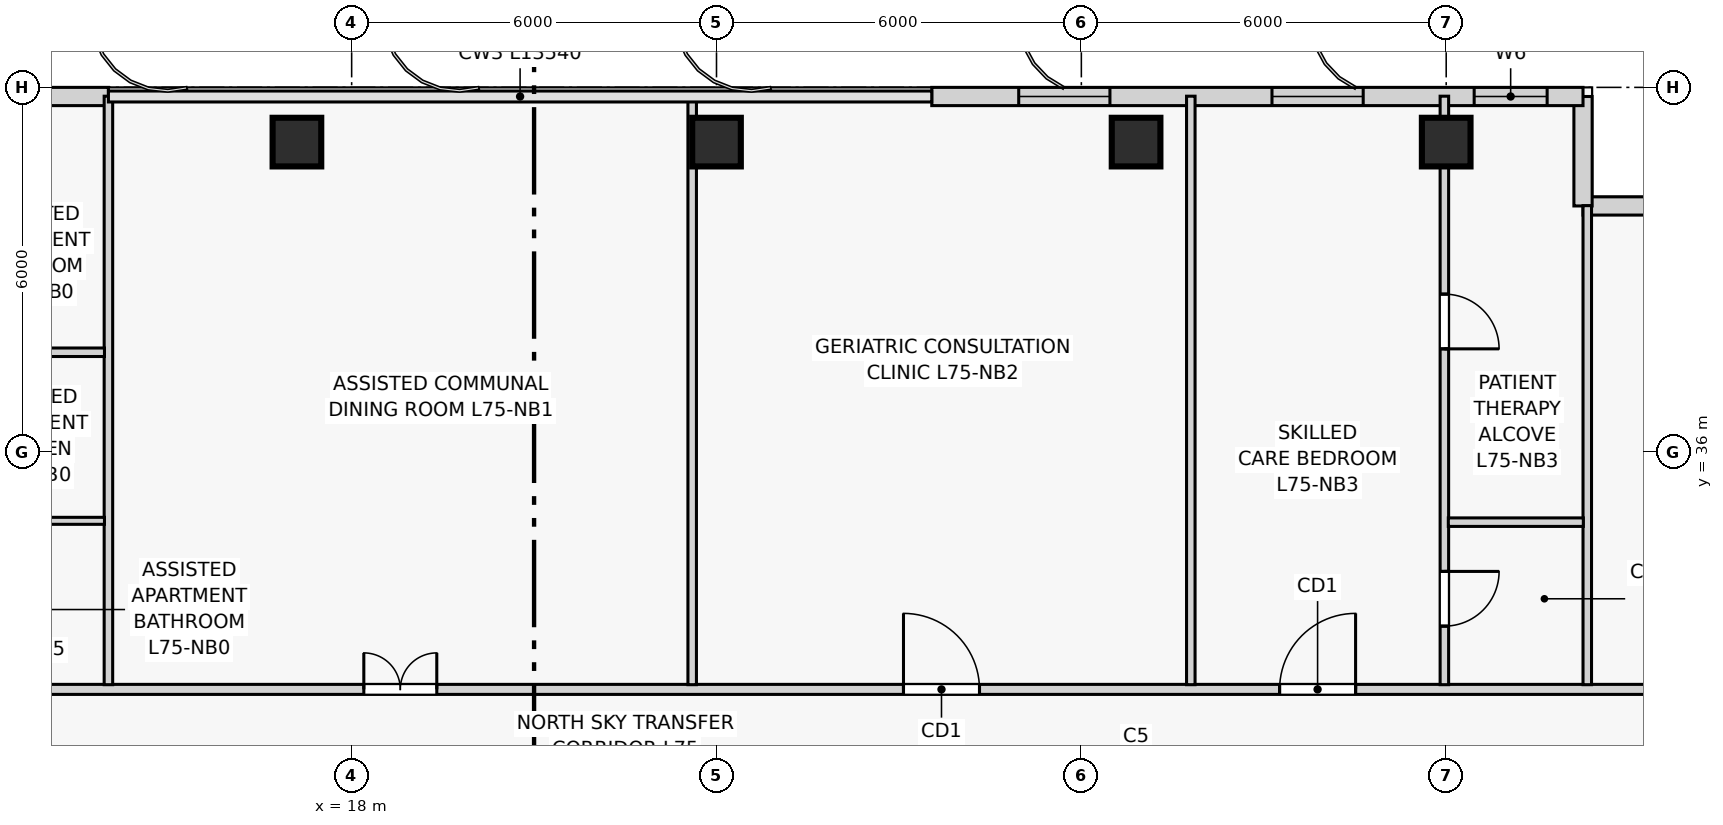
"""IFC4 building model, lengths in metres.
Left out: names, types, materials, properties, quantities, classifications, styles, units other than length and angle.
Written with IfcOpenShell. Run it as: python <this file> out.ifc"""

import sys

from ifc_helpers import new_model, si_unit, direction, frame, frame_2d, origin, origin_2d, place, context, subcontext, project, spatial, rectangle, extrude, source, transform, mapped, element, fill, save


model = new_model("IFC4")
c1 = context("Model", 3, precision=1e-05, world=origin(), true_north=direction((0.0, 1.0)))
c2 = subcontext(c1, "Body", "Model", "MODEL_VIEW")
j1 = project(units=[si_unit("LENGTHUNIT", "METRE"), si_unit("PLANEANGLEUNIT", "RADIAN")], contexts=[c1])
p1 = place(None, origin())
s1 = spatial("IfcSite", under=j1, at=p1, CompositionType="ELEMENT")
p2 = place(p1, origin())
s2 = spatial("IfcBuilding", under=s1, at=p2, CompositionType="ELEMENT")
p3 = place(p2, frame((0.0, 0.0, 285.3)))
s3 = spatial("IfcBuildingStorey", under=s2, at=p3, CompositionType="ELEMENT", Elevation=285.3)
m1 = source(origin(), c2, "Body", "SweptSolid", [
    extrude(rectangle(XDim=0.8, YDim=0.8, at=origin_2d()), origin(), (0.0, 0.0, 1.0), 4.2),
])
for number, where, z_axis, x_axis in (
    (1, (17.1, 41.1, 0.0), (0.0, 0.0, 1.0), (1.0, 0.0, 0.0)),
    (2, (24.0, 41.1, 0.0), (0.0, 0.0, 1.0), (1.0, 0.0, 0.0)),
    (3, (30.9, 41.1, 0.0), (0.0, 0.0, 1.0), (1.0, 0.0, 0.0)),
    (4, (36.0, 41.1, 0.0), (0.0, 0.0, 1.0), (1.0, 0.0, 0.0)),
):
    element("IfcColumn", number, at=place(p3, frame(where, z_axis=z_axis, x_axis=x_axis)), inside=s3, PredefinedType="COLUMN", context=c2, shape_type="MappedRepresentation", body=[
        mapped(m1, transform((0.0, 0.0, 0.0), scale=1.0)),
    ])
for number, where, z_axis, x_axis in (
    (5, (40.05, 40.05, 0.0), (0.0, 0.0, 1.0), (-1.0, 0.0, 0.0)),
    (6, (38.25, 40.05, 0.0), (0.0, 0.0, 1.0), (0.0, 1.0, 0.0)),
):
    element("IfcWall", number, at=place(p3, frame(where, z_axis=z_axis, x_axis=x_axis)), inside=s3, PredefinedType="SOLIDWALL", context=c2, shape_type="SweptSolid", body=[
        extrude(rectangle(XDim=1.8, YDim=0.3, at=frame_2d((0.9, 0.0))), origin(), (0.0, 0.0, 1.0), 3.92),
    ])
p4 = place(p3, frame((38.25, 41.85, 0.0), z_axis=(0.0, 0.0, 1.0), x_axis=(-1.0, 0.0, 0.0)))
e7 = element("IfcWall", 7, at=p4, inside=s3, PredefinedType="SOLIDWALL", context=c2, shape_type="SweptSolid", body=[
    extrude(rectangle(XDim=10.71, YDim=0.3, at=frame_2d((5.355, 0.0))), origin(), (0.0, 0.0, 1.0), 3.92),
])
p5 = place(p4, frame((0.59, 0.0, 0.95)))
e8 = element("IfcOpeningElement", 8, at=p5, cuts=e7, PredefinedType="OPENING", context=c2, shape_type="SweptSolid", body=[
    extrude(rectangle(XDim=1.2, YDim=1.5, at=frame_2d((0.6, 0.75))), frame((0.0, 0.16, 0.0), z_axis=(0.0, -1.0, 0.0), x_axis=(1.0, 0.0, 0.0)), (0.0, 0.0, 1.0), 0.32),
])
p6 = place(p4, frame((3.615, 0.0, 0.85)))
e9 = element("IfcOpeningElement", 9, at=p6, cuts=e7, PredefinedType="OPENING", context=c2, shape_type="SweptSolid", body=[
    extrude(rectangle(XDim=1.5, YDim=1.8, at=frame_2d((0.75, 0.9))), frame((0.0, 0.16, 0.0), z_axis=(0.0, -1.0, 0.0), x_axis=(1.0, 0.0, 0.0)), (0.0, 0.0, 1.0), 0.32),
])
p7 = place(p4, frame((7.78, 0.0, 0.85)))
e10 = element("IfcOpeningElement", 10, at=p7, cuts=e7, PredefinedType="OPENING", context=c2, shape_type="SweptSolid", body=[
    extrude(rectangle(XDim=1.5, YDim=1.8, at=frame_2d((0.75, 0.9))), frame((0.0, 0.16, 0.0), z_axis=(0.0, -1.0, 0.0), x_axis=(1.0, 0.0, 0.0)), (0.0, 0.0, 1.0), 0.32),
])
p8 = place(p3, frame((14.0, 41.85, 0.0), z_axis=(0.0, 0.0, 1.0), x_axis=(-1.0, 0.0, 0.0)))
e11 = element("IfcWall", 11, at=p8, inside=s3, PredefinedType="SOLIDWALL", context=c2, shape_type="SweptSolid", body=[
    extrude(rectangle(XDim=7.25, YDim=0.3, at=frame_2d((3.625, 0.0))), origin(), (0.0, 0.0, 1.0), 3.92),
])
p9 = place(p8, frame((1.057, 0.0, 0.85)))
e12 = element("IfcOpeningElement", 12, at=p9, cuts=e11, PredefinedType="OPENING", context=c2, shape_type="SweptSolid", body=[
    extrude(rectangle(XDim=1.5, YDim=1.8, at=frame_2d((0.75, 0.9))), frame((0.0, 0.16, 0.0), z_axis=(0.0, -1.0, 0.0), x_axis=(1.0, 0.0, 0.0)), (0.0, 0.0, 1.0), 0.32),
])
p10 = place(p8, frame((4.582, 0.0, 0.85)))
e13 = element("IfcOpeningElement", 13, at=p10, cuts=e11, PredefinedType="OPENING", context=c2, shape_type="SweptSolid", body=[
    extrude(rectangle(XDim=1.5, YDim=1.8, at=frame_2d((0.75, 0.9))), frame((0.0, 0.16, 0.0), z_axis=(0.0, -1.0, 0.0), x_axis=(1.0, 0.0, 0.0)), (0.0, 0.0, 1.0), 0.32),
])
p11 = place(p3, frame((3.145, 32.1, 0.0), z_axis=(0.0, 0.0, 1.0), x_axis=(1.0, 0.0, 0.0)))
e14 = element("IfcWall", 14, at=p11, inside=s3, PredefinedType="PARTITIONING", context=c2, shape_type="SweptSolid", body=[
    extrude(rectangle(XDim=38.71, YDim=0.165, at=frame_2d((19.355, 0.0))), origin(), (0.0, 0.0, 1.0), 3.92),
])
p12 = place(p11, frame((4.913, 0.0, 0.0)))
e15 = element("IfcOpeningElement", 15, at=p12, cuts=e14, PredefinedType="OPENING", context=c2, shape_type="SweptSolid", body=[
    extrude(rectangle(XDim=1.05, YDim=2.15, at=frame_2d((0.525, 1.075))), frame((0.0, 0.093, 0.0), z_axis=(0.0, -1.0, 0.0), x_axis=(1.0, 0.0, 0.0)), (0.0, 0.0, 1.0), 0.185),
])
p13 = place(p11, frame((15.055, 0.0, 0.0)))
e16 = element("IfcOpeningElement", 16, at=p13, cuts=e14, PredefinedType="OPENING", context=c2, shape_type="SweptSolid", body=[
    extrude(rectangle(XDim=1.2, YDim=2.2, at=frame_2d((0.6, 1.1))), frame((0.0, 0.093, 0.0), z_axis=(0.0, -1.0, 0.0), x_axis=(1.0, 0.0, 0.0)), (0.0, 0.0, 1.0), 0.185),
])
p14 = place(p11, frame((23.93, 0.0, 0.0)))
e17 = element("IfcOpeningElement", 17, at=p14, cuts=e14, PredefinedType="OPENING", context=c2, shape_type="SweptSolid", body=[
    extrude(rectangle(XDim=1.25, YDim=2.2, at=frame_2d((0.625, 1.1))), frame((0.0, 0.093, 0.0), z_axis=(0.0, -1.0, 0.0), x_axis=(1.0, 0.0, 0.0)), (0.0, 0.0, 1.0), 0.185),
])
p15 = place(p11, frame((30.115, 0.0, 0.0)))
e18 = element("IfcOpeningElement", 18, at=p15, cuts=e14, PredefinedType="OPENING", context=c2, shape_type="SweptSolid", body=[
    extrude(rectangle(XDim=1.25, YDim=2.2, at=frame_2d((0.625, 1.1))), frame((0.0, 0.093, 0.0), z_axis=(0.0, -1.0, 0.0), x_axis=(1.0, 0.0, 0.0)), (0.0, 0.0, 1.0), 0.185),
])
p16 = place(p3, frame((14.0, 32.177, 0.0), z_axis=(0.0, 0.0, 1.0), x_axis=(0.0, 1.0, 0.0)))
e19 = element("IfcWall", 19, at=p16, inside=s3, PredefinedType="PARTITIONING", context=c2, shape_type="SweptSolid", body=[
    extrude(rectangle(XDim=9.677, YDim=0.14, at=frame_2d((4.839, 0.0))), origin(), (0.0, 0.0, 1.0), 3.92),
])
p17 = place(p3, frame((23.6, 32.177, 0.0), z_axis=(0.0, 0.0, 1.0), x_axis=(0.0, 1.0, 0.0)))
e20 = element("IfcWall", 20, at=p17, inside=s3, PredefinedType="PARTITIONING", context=c2, shape_type="SweptSolid", body=[
    extrude(rectangle(XDim=9.677, YDim=0.14, at=frame_2d((4.839, 0.0))), origin(), (0.0, 0.0, 1.0), 3.07),
])
p18 = place(p3, frame((31.8, 32.177, 0.0), z_axis=(0.0, 0.0, 1.0), x_axis=(0.0, 1.0, 0.0)))
e21 = element("IfcWall", 21, at=p18, inside=s3, PredefinedType="PARTITIONING", context=c2, shape_type="SweptSolid", body=[
    extrude(rectangle(XDim=9.677, YDim=0.14, at=frame_2d((4.839, 0.0))), origin(), (0.0, 0.0, 1.0), 3.92),
])
p19 = place(p3, frame((38.32, 32.177, 0.0), z_axis=(0.0, 0.0, 1.0), x_axis=(0.0, 1.0, 0.0)))
e22 = element("IfcWall", 22, at=p19, inside=s3, PredefinedType="PARTITIONING", context=c2, shape_type="SweptSolid", body=[
    extrude(rectangle(XDim=7.877, YDim=0.14, at=frame_2d((3.939, 0.0))), origin(), (0.0, 0.0, 1.0), 3.92),
])
p20 = place(p3, frame((10.539, 37.644, 0.0), z_axis=(0.0, 0.0, 1.0), x_axis=(1.0, 0.0, 0.0)))
e23 = element("IfcWall", 23, at=p20, inside=s3, PredefinedType="PLUMBINGWALL", context=c2, shape_type="SweptSolid", body=[
    extrude(rectangle(XDim=3.396, YDim=0.14, at=frame_2d((1.698, 0.0))), origin(), (0.0, 0.0, 1.0), 3.92),
])
p21 = place(p3, frame((10.539, 34.872, 0.0), z_axis=(0.0, 0.0, 1.0), x_axis=(1.0, 0.0, 0.0)))
e24 = element("IfcWall", 24, at=p21, inside=s3, PredefinedType="PARTITIONING", context=c2, shape_type="SweptSolid", body=[
    extrude(rectangle(XDim=3.396, YDim=0.115, at=frame_2d((1.698, 0.0))), origin(), (0.0, 0.0, 1.0), 3.92),
])
p22 = place(p3, frame((35.97, 32.177, 0.0), z_axis=(0.0, 0.0, 1.0), x_axis=(0.0, 1.0, 0.0)))
e25 = element("IfcWall", 25, at=p22, inside=s3, PredefinedType="PLUMBINGWALL", context=c2, shape_type="SweptSolid", body=[
    extrude(rectangle(XDim=9.677, YDim=0.14, at=frame_2d((4.839, 0.0))), origin(), (0.0, 0.0, 1.0), 3.07),
])
p23 = place(p22, frame((0.962, 0.0, 0.0)))
e26 = element("IfcOpeningElement", 26, at=p23, cuts=e25, PredefinedType="OPENING", context=c2, shape_type="SweptSolid", body=[
    extrude(rectangle(XDim=0.9, YDim=2.1, at=frame_2d((0.45, 1.05))), frame((0.0, 0.08, 0.0), z_axis=(0.0, -1.0, 0.0), x_axis=(1.0, 0.0, 0.0)), (0.0, 0.0, 1.0), 0.16),
])
p24 = place(p22, frame((5.522, 0.0, 0.0)))
e27 = element("IfcOpeningElement", 27, at=p24, cuts=e25, PredefinedType="OPENING", context=c2, shape_type="SweptSolid", body=[
    extrude(rectangle(XDim=0.9, YDim=2.1, at=frame_2d((0.45, 1.05))), frame((0.0, 0.08, 0.0), z_axis=(0.0, -1.0, 0.0), x_axis=(1.0, 0.0, 0.0)), (0.0, 0.0, 1.0), 0.16),
])
p25 = place(p3, frame((36.035, 34.85, 0.0), z_axis=(0.0, 0.0, 1.0), x_axis=(1.0, 0.0, 0.0)))
e28 = element("IfcWall", 28, at=p25, inside=s3, PredefinedType="PLUMBINGWALL", context=c2, shape_type="SweptSolid", body=[
    extrude(rectangle(XDim=2.22, YDim=0.14, at=frame_2d((1.11, 0.0))), origin(), (0.0, 0.0, 1.0), 3.92),
])
m2 = source(origin(), c2, "Body", "SweptSolid", [
    extrude(rectangle(XDim=1.2, YDim=1.5, at=frame_2d((0.6, 0.75))), frame((0.0, 0.03, 0.0), z_axis=(0.0, -1.0, 0.0), x_axis=(1.0, 0.0, 0.0)), (0.0, 0.0, 1.0), 0.06),
])
p26 = place(p5, origin())
e29 = element("IfcWindow", 29, at=p26, inside=s3, PartitioningType="SINGLE_PANEL", PredefinedType="WINDOW", context=c2, shape_type="MappedRepresentation", body=[
    mapped(m2, transform((0.0, 0.0, 0.0), scale=1.0)),
])
fill(e8, e29)
m3 = source(origin(), c2, "Body", "SweptSolid", [
    extrude(rectangle(XDim=1.5, YDim=1.8, at=frame_2d((0.75, 0.9))), frame((0.0, 0.03, 0.0), z_axis=(0.0, -1.0, 0.0), x_axis=(1.0, 0.0, 0.0)), (0.0, 0.0, 1.0), 0.06),
])
p27 = place(p6, origin())
e30 = element("IfcWindow", 30, at=p27, inside=s3, PartitioningType="SINGLE_PANEL", PredefinedType="WINDOW", context=c2, shape_type="MappedRepresentation", body=[
    mapped(m3, transform((0.0, 0.0, 0.0), scale=1.0)),
])
fill(e9, e30)
p28 = place(p7, origin())
e31 = element("IfcWindow", 31, at=p28, inside=s3, PartitioningType="SINGLE_PANEL", PredefinedType="WINDOW", context=c2, shape_type="MappedRepresentation", body=[
    mapped(m3, transform((0.0, 0.0, 0.0), scale=1.0)),
])
fill(e10, e31)
m4 = source(origin(), c2, "Body", "SweptSolid", [
    extrude(rectangle(XDim=1.2, YDim=2.2, at=frame_2d((0.6, 1.1))), frame((0.0, 0.025, 0.0), z_axis=(0.0, -1.0, 0.0), x_axis=(1.0, 0.0, 0.0)), (0.0, 0.0, 1.0), 0.05),
])
p29 = place(p13, origin())
e32 = element("IfcDoor", 32, at=p29, inside=s3, OperationType="DOUBLE_DOOR_SINGLE_SWING", PredefinedType="DOOR", context=c2, shape_type="MappedRepresentation", body=[
    mapped(m4, transform((0.0, 0.0, 0.0), scale=1.0)),
])
fill(e16, e32)
m5 = source(origin(), c2, "Body", "SweptSolid", [
    extrude(rectangle(XDim=1.25, YDim=2.2, at=frame_2d((0.625, 1.1))), frame((0.0, 0.025, 0.0), z_axis=(0.0, -1.0, 0.0), x_axis=(1.0, 0.0, 0.0)), (0.0, 0.0, 1.0), 0.05),
])
p30 = place(p14, origin())
e33 = element("IfcDoor", 33, at=p30, inside=s3, OperationType="SINGLE_SWING_LEFT", PredefinedType="DOOR", context=c2, shape_type="MappedRepresentation", body=[
    mapped(m5, transform((0.0, 0.0, 0.0), scale=1.0)),
])
fill(e17, e33)
p31 = place(p15, origin())
e34 = element("IfcDoor", 34, at=p31, inside=s3, OperationType="SINGLE_SWING_RIGHT", PredefinedType="DOOR", context=c2, shape_type="MappedRepresentation", body=[
    mapped(m5, transform((0.0, 0.0, 0.0), scale=1.0)),
])
fill(e18, e34)
m6 = source(origin(), c2, "Body", "SweptSolid", [
    extrude(rectangle(XDim=0.9, YDim=2.1, at=frame_2d((0.45, 1.05))), frame((0.0, 0.025, 0.0), z_axis=(0.0, -1.0, 0.0), x_axis=(1.0, 0.0, 0.0)), (0.0, 0.0, 1.0), 0.05),
])
p32 = place(p23, frame((0.9, 0.0, 0.0), z_axis=(0.0, 0.0, 1.0), x_axis=(-1.0, 0.0, 0.0)))
e35 = element("IfcDoor", 35, at=p32, inside=s3, OperationType="SINGLE_SWING_LEFT", PredefinedType="DOOR", context=c2, shape_type="MappedRepresentation", body=[
    mapped(m6, transform((0.0, 0.0, 0.0), scale=1.0)),
])
fill(e26, e35)
p33 = place(p24, frame((0.9, 0.0, 0.0), z_axis=(0.0, 0.0, 1.0), x_axis=(-1.0, 0.0, 0.0)))
e36 = element("IfcDoor", 36, at=p33, inside=s3, OperationType="SINGLE_SWING_RIGHT", PredefinedType="DOOR", context=c2, shape_type="MappedRepresentation", body=[
    mapped(m6, transform((0.0, 0.0, 0.0), scale=1.0)),
])
fill(e27, e36)
save(model, sys.argv[1])
